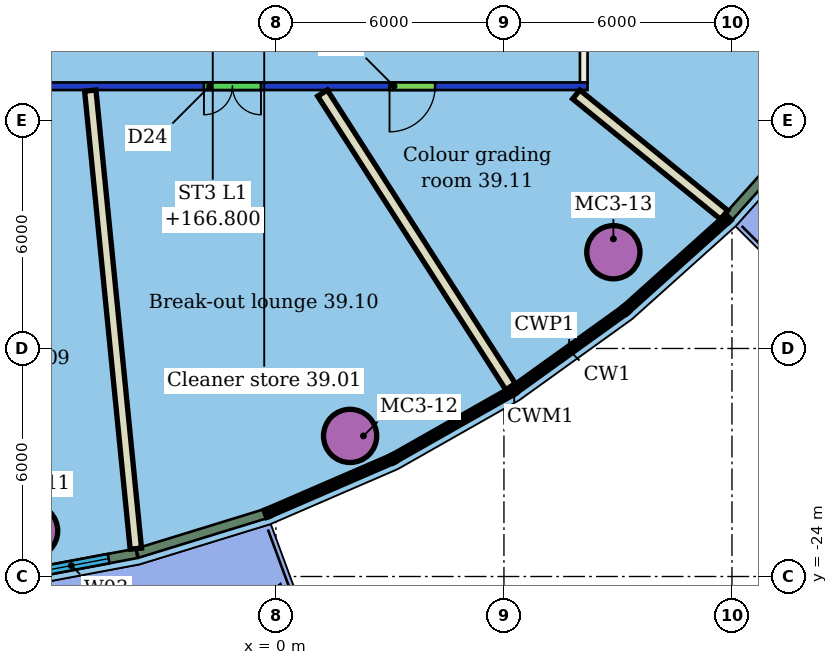
"""IFC4 building model, lengths in metres.
Left out: names, types, materials, properties, quantities, classifications, styles, units other than length and angle.
Written with IfcOpenShell. Run it as: python <this file> out.ifc"""

import sys

from ifc_helpers import new_model, si_unit, direction, frame, frame_2d, origin, origin_2d, place, context, subcontext, project, spatial, rectangle, hollow_circle, extrude, element, fill, save


model = new_model("IFC4")
c1 = context("Model", 3, precision=1e-05, world=origin(), true_north=direction((0.0, 1.0)))
c2 = subcontext(c1, "Body", "Model", "MODEL_VIEW")
j1 = project(units=[si_unit("LENGTHUNIT", "METRE"), si_unit("PLANEANGLEUNIT", "RADIAN")], contexts=[c1])
p1 = place(None, origin())
s1 = spatial("IfcSite", under=j1, at=p1, CompositionType="ELEMENT")
p2 = place(p1, origin())
s2 = spatial("IfcBuilding", under=s1, at=p2, CompositionType="ELEMENT")
p3 = place(p2, frame((0.0, 0.0, 165.0)))
s3 = spatial("IfcBuildingStorey", under=s2, at=p3, CompositionType="ELEMENT", Elevation=165.0)
for number, where, z_axis, x_axis in (
    (1, (-6.442, -22.8, 0.0), (0.0, 0.0, 1.0), (1.0, 0.0, 0.0)),
    (2, (1.952, -20.301, 0.0), (0.0, 0.0, 1.0), (1.0, 0.0, 0.0)),
    (3, (8.879, -15.467, 0.0), (0.0, 0.0, 1.0), (1.0, 0.0, 0.0)),
):
    element("IfcColumn", number, at=place(p3, frame(where, z_axis=z_axis, x_axis=x_axis)), inside=s3, PredefinedType="COLUMN", context=c2, shape_type="SweptSolid", body=[
        extrude(hollow_circle(Radius=0.7, WallThickness=0.05, at=origin_2d()), origin(), (0.0, 0.0, 1.0), 3.45),
    ])
p4 = place(p3, frame((8.2, -11.1, 0.0), z_axis=(0.0, 0.0, 1.0), x_axis=(-1.0, 0.0, 0.0)))
e4 = element("IfcWall", 4, at=p4, inside=s3, PredefinedType="PARTITIONING", context=c2, shape_type="SweptSolid", body=[
    extrude(rectangle(XDim=28.4, YDim=0.2, at=frame_2d((14.2, 0.0))), origin(), (0.0, 0.0, 1.0), 3.05),
])
p5 = place(p4, frame((24.59, 0.0, 0.0)))
e5 = element("IfcOpeningElement", 5, at=p5, cuts=e4, PredefinedType="OPENING", context=c2, shape_type="SweptSolid", body=[
    extrude(rectangle(XDim=1.2, YDim=2.1, at=frame_2d((0.6, 1.05))), frame((0.0, 0.11, 0.0), z_axis=(0.0, -1.0, 0.0), x_axis=(1.0, 0.0, 0.0)), (0.0, 0.0, 1.0), 0.22),
])
p6 = place(p4, frame((19.316, 0.0, 0.0)))
e6 = element("IfcOpeningElement", 6, at=p6, cuts=e4, PredefinedType="OPENING", context=c2, shape_type="SweptSolid", body=[
    extrude(rectangle(XDim=1.2, YDim=2.1, at=frame_2d((0.6, 1.05))), frame((0.0, 0.11, 0.0), z_axis=(0.0, -1.0, 0.0), x_axis=(1.0, 0.0, 0.0)), (0.0, 0.0, 1.0), 0.22),
])
p7 = place(p4, frame((14.986, 0.0, 0.0)))
e7 = element("IfcOpeningElement", 7, at=p7, cuts=e4, PredefinedType="OPENING", context=c2, shape_type="SweptSolid", body=[
    extrude(rectangle(XDim=1.8, YDim=2.4, at=frame_2d((0.9, 1.2))), frame((0.0, 0.11, 0.0), z_axis=(0.0, -1.0, 0.0), x_axis=(1.0, 0.0, 0.0)), (0.0, 0.0, 1.0), 0.22),
])
p8 = place(p4, frame((8.594, 0.0, 0.0)))
e8 = element("IfcOpeningElement", 8, at=p8, cuts=e4, PredefinedType="OPENING", context=c2, shape_type="SweptSolid", body=[
    extrude(rectangle(XDim=1.5, YDim=2.1, at=frame_2d((0.75, 1.05))), frame((0.0, 0.11, 0.0), z_axis=(0.0, -1.0, 0.0), x_axis=(1.0, 0.0, 0.0)), (0.0, 0.0, 1.0), 0.22),
])
p9 = place(p4, frame((4.011, 0.0, 0.0)))
e9 = element("IfcOpeningElement", 9, at=p9, cuts=e4, PredefinedType="OPENING", context=c2, shape_type="SweptSolid", body=[
    extrude(rectangle(XDim=1.2, YDim=2.1, at=frame_2d((0.6, 1.05))), frame((0.0, 0.11, 0.0), z_axis=(0.0, -1.0, 0.0), x_axis=(1.0, 0.0, 0.0)), (0.0, 0.0, 1.0), 0.22),
])
p10 = place(p3, frame((8.1, 11.0, 0.0), z_axis=(0.0, 0.0, 1.0), x_axis=(0.0, -1.0, 0.0)))
e10 = element("IfcWall", 10, at=p10, inside=s3, PredefinedType="PARTITIONING", context=c2, shape_type="SweptSolid", body=[
    extrude(rectangle(XDim=22.0, YDim=0.2, at=frame_2d((11.0, 0.0))), origin(), (0.0, 0.0, 1.0), 3.45),
])
p11 = place(p10, frame((12.895, 0.0, 0.0)))
e11 = element("IfcOpeningElement", 11, at=p11, cuts=e10, PredefinedType="OPENING", context=c2, shape_type="SweptSolid", body=[
    extrude(rectangle(XDim=1.2, YDim=2.1, at=frame_2d((0.6, 1.05))), frame((0.0, 0.11, 0.0), z_axis=(0.0, -1.0, 0.0), x_axis=(1.0, 0.0, 0.0)), (0.0, 0.0, 1.0), 0.22),
])
p12 = place(p10, frame((5.997, 0.0, 0.0)))
e12 = element("IfcOpeningElement", 12, at=p12, cuts=e10, PredefinedType="OPENING", context=c2, shape_type="SweptSolid", body=[
    extrude(rectangle(XDim=1.1, YDim=2.1, at=frame_2d((0.55, 1.05))), frame((0.0, 0.11, 0.0), z_axis=(0.0, -1.0, 0.0), x_axis=(1.0, 0.0, 0.0)), (0.0, 0.0, 1.0), 0.22),
])
p13 = place(p3, frame((-3.687, -23.267, 0.0), z_axis=(0.0, 0.0, 1.0), x_axis=(-0.098952866834, 0.995092121437, 0.0)))
e13 = element("IfcWall", 13, at=p13, inside=s3, PredefinedType="PARTITIONING", context=c2, shape_type="SweptSolid", body=[
    extrude(rectangle(XDim=12.112, YDim=0.3, at=frame_2d((6.056, 0.0))), origin(), (0.0, 0.0, 1.0), 3.45),
])
p14 = place(p3, frame((6.172, -19.004, 0.0), z_axis=(0.0, 0.0, 1.0), x_axis=(-0.539372431885, 0.842067324934, 0.0)))
e14 = element("IfcWall", 14, at=p14, inside=s3, PredefinedType="PARTITIONING", context=c2, shape_type="SweptSolid", body=[
    extrude(rectangle(XDim=9.171, YDim=0.3, at=frame_2d((4.586, 0.0))), origin(), (0.0, 0.0, 1.0), 3.45),
])
p15 = place(p3, frame((11.794, -14.485, 0.0), z_axis=(0.0, 0.0, 1.0), x_axis=(-0.775534864138, 0.63130473981, 0.0)))
e15 = element("IfcWall", 15, at=p15, inside=s3, PredefinedType="PARTITIONING", context=c2, shape_type="SweptSolid", body=[
    extrude(rectangle(XDim=5.019, YDim=0.3, at=frame_2d((2.509, 0.0))), origin(), (0.0, 0.0, 1.0), 3.45),
])
p16 = place(p3, frame((-7.101, -24.035, 0.0), z_axis=(0.0, 0.0, 1.0), x_axis=(0.982808840364, 0.184626063442, 0.0)))
e16 = element("IfcWall", 16, at=p16, inside=s3, PredefinedType="SOLIDWALL", context=c2, shape_type="SweptSolid", body=[
    extrude(rectangle(XDim=3.494, YDim=0.25, at=frame_2d((1.747, 0.0))), origin(), (0.0, 0.0, 1.0), 3.1),
])
p17 = place(p16, frame((0.747, 0.0, 0.9)))
e17 = element("IfcOpeningElement", 17, at=p17, cuts=e16, PredefinedType="OPENING", context=c2, shape_type="SweptSolid", body=[
    extrude(rectangle(XDim=2.0, YDim=2.1, at=frame_2d((1.0, 1.05))), frame((0.0, 0.135, 0.0), z_axis=(0.0, -1.0, 0.0), x_axis=(1.0, 0.0, 0.0)), (0.0, 0.0, 1.0), 0.27),
])
p18 = place(p3, frame((-3.646, -23.385, 0.0), z_axis=(0.0, 0.0, 1.0), x_axis=(0.955795559149, 0.294032054565, 0.0)))
e18 = element("IfcWall", 18, at=p18, inside=s3, PredefinedType="SOLIDWALL", context=c2, shape_type="SweptSolid", body=[
    extrude(rectangle(XDim=3.508, YDim=0.25, at=frame_2d((1.754, 0.0))), origin(), (0.0, 0.0, 1.0), 3.1),
])
p19 = place(p3, frame((11.919, -14.532, 0.0), z_axis=(0.0, 0.0, 1.0), x_axis=(0.666731798782, 0.745297731443, 0.0)))
e19 = element("IfcWall", 19, at=p19, inside=s3, PredefinedType="SOLIDWALL", context=c2, shape_type="SweptSolid", body=[
    extrude(rectangle(XDim=3.508, YDim=0.25, at=frame_2d((1.754, 0.0))), origin(), (0.0, 0.0, 1.0), 3.1),
])
p20 = place(p8, origin())
e20 = element("IfcDoor", 20, at=p20, inside=s3, OperationType="DOUBLE_DOOR_SINGLE_SWING", PredefinedType="DOOR", context=c2, shape_type="SweptSolid", body=[
    extrude(rectangle(XDim=1.5, YDim=2.1, at=frame_2d((0.75, 1.05))), frame((0.0, 0.025, 0.0), z_axis=(0.0, -1.0, 0.0), x_axis=(1.0, 0.0, 0.0)), (0.0, 0.0, 1.0), 0.05),
])
fill(e8, e20)
p21 = place(p9, origin())
e21 = element("IfcDoor", 21, at=p21, inside=s3, OperationType="SINGLE_SWING_RIGHT", PredefinedType="DOOR", context=c2, shape_type="SweptSolid", body=[
    extrude(rectangle(XDim=1.2, YDim=2.1, at=frame_2d((0.6, 1.05))), frame((0.0, 0.025, 0.0), z_axis=(0.0, -1.0, 0.0), x_axis=(1.0, 0.0, 0.0)), (0.0, 0.0, 1.0), 0.05),
])
fill(e9, e21)
p22 = place(p17, origin())
e22 = element("IfcWindow", 22, at=p22, inside=s3, PartitioningType="SINGLE_PANEL", PredefinedType="WINDOW", context=c2, shape_type="SweptSolid", body=[
    extrude(rectangle(XDim=2.0, YDim=2.1, at=frame_2d((1.0, 1.05))), frame((0.0, 0.03, 0.0), z_axis=(0.0, -1.0, 0.0), x_axis=(1.0, 0.0, 0.0)), (0.0, 0.0, 1.0), 0.06),
])
fill(e17, e22)
save(model, sys.argv[1])
